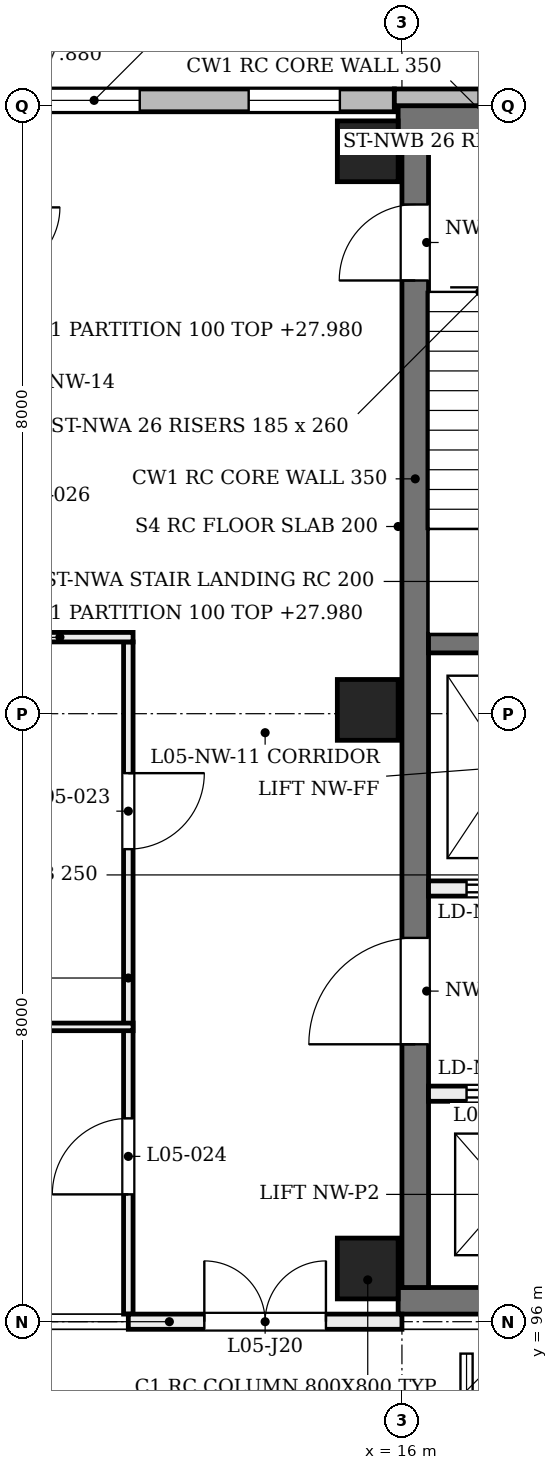
"""IFC4 building model, lengths in metres.
Left out: names, types, materials, properties, quantities, classifications, styles, units other than length and angle.
Written with IfcOpenShell. Run it as: python <this file> out.ifc"""

import sys

from ifc_helpers import new_model, si_unit, direction, frame, frame_2d, origin, origin_2d, place, context, subcontext, project, spatial, rectangle, extrude, element, fill, save


model = new_model("IFC4")
c1 = context("Model", 3, precision=1e-05, world=origin(), true_north=direction((0.0, 1.0)))
c2 = subcontext(c1, "Body", "Model", "MODEL_VIEW")
j1 = project(units=[si_unit("LENGTHUNIT", "METRE"), si_unit("PLANEANGLEUNIT", "RADIAN")], contexts=[c1])
p1 = place(None, origin())
s1 = spatial("IfcSite", under=j1, at=p1, CompositionType="ELEMENT")
p2 = place(p1, origin())
s2 = spatial("IfcBuilding", under=s1, at=p2, CompositionType="ELEMENT")
p3 = place(p2, frame((0.0, 0.0, 24.0)))
s3 = spatial("IfcBuildingStorey", under=s2, at=p3, CompositionType="ELEMENT", Elevation=24.0)
for number, where, z_axis, x_axis in (
    (1, (15.95, 96.275, 0.0), (0.0, 0.0, 1.0), (1.0, 0.0, 0.0)),
    (2, (15.95, 111.825, 0.0), (0.0, 0.0, 1.0), (1.0, 0.0, 0.0)),
):
    element("IfcWall", number, at=place(p3, frame(where, z_axis=z_axis, x_axis=x_axis)), inside=s3, PredefinedType="SHEAR", context=c2, shape_type="SweptSolid", body=[
        extrude(rectangle(XDim=7.95, YDim=0.35, at=frame_2d((3.975, 0.0))), origin(), (0.0, 0.0, 1.0), 4.58),
    ])
p4 = place(p3, frame((16.175, 96.45, 0.0), z_axis=(0.0, 0.0, 1.0), x_axis=(0.0, 1.0, 0.0)))
e3 = element("IfcWall", 3, at=p4, inside=s3, PredefinedType="SHEAR", context=c2, shape_type="SweptSolid", body=[
    extrude(rectangle(XDim=15.2, YDim=0.35, at=frame_2d((7.6, 0.0))), origin(), (0.0, 0.0, 1.0), 4.58),
])
p5 = place(p4, frame((13.25, 0.0, 0.0)))
e4 = element("IfcOpeningElement", 4, at=p5, cuts=e3, PredefinedType="OPENING", context=c2, shape_type="SweptSolid", body=[
    extrude(rectangle(XDim=1.0, YDim=2.1, at=frame_2d((0.5, 1.05))), frame((0.0, 0.185, 0.0), z_axis=(0.0, -1.0, 0.0), x_axis=(1.0, 0.0, 0.0)), (0.0, 0.0, 1.0), 0.37),
])
p6 = place(p4, frame((3.2, 0.0, 0.0)))
e5 = element("IfcOpeningElement", 5, at=p6, cuts=e3, PredefinedType="OPENING", context=c2, shape_type="SweptSolid", body=[
    extrude(rectangle(XDim=1.4, YDim=2.1, at=frame_2d((0.7, 1.05))), frame((0.0, 0.185, 0.0), z_axis=(0.0, -1.0, 0.0), x_axis=(1.0, 0.0, 0.0)), (0.0, 0.0, 1.0), 0.37),
])
for number, where, z_axis, x_axis in (
    (6, (15.55, 96.7, 0.0), (0.0, 0.0, 1.0), (1.0, 0.0, 0.0)),
    (7, (15.55, 104.05, 0.0), (0.0, 0.0, 1.0), (1.0, 0.0, 0.0)),
    (8, (15.55, 111.4, 0.0), (0.0, 0.0, 1.0), (1.0, 0.0, 0.0)),
):
    element("IfcColumn", number, at=place(p3, frame(where, z_axis=z_axis, x_axis=x_axis)), inside=s3, PredefinedType="COLUMN", context=c2, shape_type="SweptSolid", body=[
        extrude(rectangle(XDim=0.8, YDim=0.8, at=origin_2d()), origin(), (0.0, 0.0, 1.0), 4.58),
    ])
p7 = place(p3, frame((8.0, 112.07, 0.0), z_axis=(0.0, 0.0, 1.0), x_axis=(1.0, 0.0, 0.0)))
e9 = element("IfcWall", 9, at=p7, inside=s3, PredefinedType="SOLIDWALL", context=c2, shape_type="SweptSolid", body=[
    extrude(rectangle(XDim=7.9, YDim=0.3, at=frame_2d((3.95, 0.0))), origin(), (0.0, 0.0, 1.0), 3.9),
])
p8 = place(p7, frame((0.717, 0.0, 1.0)))
e10 = element("IfcOpeningElement", 10, at=p8, cuts=e9, PredefinedType="OPENING", context=c2, shape_type="SweptSolid", body=[
    extrude(rectangle(XDim=1.2, YDim=2.4, at=frame_2d((0.6, 1.2))), frame((0.0, 0.16, 0.0), z_axis=(0.0, -1.0, 0.0), x_axis=(1.0, 0.0, 0.0)), (0.0, 0.0, 1.0), 0.32),
])
p9 = place(p7, frame((3.35, 0.0, 1.0)))
e11 = element("IfcOpeningElement", 11, at=p9, cuts=e9, PredefinedType="OPENING", context=c2, shape_type="SweptSolid", body=[
    extrude(rectangle(XDim=1.2, YDim=2.4, at=frame_2d((0.6, 1.2))), frame((0.0, 0.16, 0.0), z_axis=(0.0, -1.0, 0.0), x_axis=(1.0, 0.0, 0.0)), (0.0, 0.0, 1.0), 0.32),
])
p10 = place(p7, frame((5.983, 0.0, 1.0)))
e12 = element("IfcOpeningElement", 12, at=p10, cuts=e9, PredefinedType="OPENING", context=c2, shape_type="SweptSolid", body=[
    extrude(rectangle(XDim=1.2, YDim=2.4, at=frame_2d((0.6, 1.2))), frame((0.0, 0.16, 0.0), z_axis=(0.0, -1.0, 0.0), x_axis=(1.0, 0.0, 0.0)), (0.0, 0.0, 1.0), 0.32),
])
p11 = place(p3, frame((15.9, 112.11, 0.0), z_axis=(0.0, 0.0, 1.0), x_axis=(1.0, 0.0, 0.0)))
e13 = element("IfcWall", 13, at=p11, inside=s3, PredefinedType="SOLIDWALL", context=c2, shape_type="SweptSolid", body=[
    extrude(rectangle(XDim=8.2, YDim=0.22, at=frame_2d((4.1, 0.0))), origin(), (0.0, 0.0, 1.0), 3.9),
])
p12 = place(p11, frame((1.108, 0.0, 0.9)))
e14 = element("IfcOpeningElement", 14, at=p12, cuts=e13, PredefinedType="OPENING", context=c2, shape_type="SweptSolid", body=[
    extrude(rectangle(XDim=0.45, YDim=2.6, at=frame_2d((0.225, 1.3))), frame((0.0, 0.12, 0.0), z_axis=(0.0, -1.0, 0.0), x_axis=(1.0, 0.0, 0.0)), (0.0, 0.0, 1.0), 0.24),
])
p13 = place(p11, frame((3.775, 0.0, 0.9)))
e15 = element("IfcOpeningElement", 15, at=p13, cuts=e13, PredefinedType="OPENING", context=c2, shape_type="SweptSolid", body=[
    extrude(rectangle(XDim=0.45, YDim=2.6, at=frame_2d((0.225, 1.3))), frame((0.0, 0.12, 0.0), z_axis=(0.0, -1.0, 0.0), x_axis=(1.0, 0.0, 0.0)), (0.0, 0.0, 1.0), 0.24),
])
p14 = place(p11, frame((6.442, 0.0, 0.9)))
e16 = element("IfcOpeningElement", 16, at=p14, cuts=e13, PredefinedType="OPENING", context=c2, shape_type="SweptSolid", body=[
    extrude(rectangle(XDim=0.45, YDim=2.6, at=frame_2d((0.225, 1.3))), frame((0.0, 0.12, 0.0), z_axis=(0.0, -1.0, 0.0), x_axis=(1.0, 0.0, 0.0)), (0.0, 0.0, 1.0), 0.24),
])
p15 = place(p3, frame((16.35, 104.925, 0.0), z_axis=(0.0, 0.0, 1.0), x_axis=(1.0, 0.0, 0.0)))
e17 = element("IfcWall", 17, at=p15, inside=s3, PredefinedType="SOLIDWALL", context=c2, shape_type="SweptSolid", body=[
    extrude(rectangle(XDim=3.1, YDim=0.25, at=frame_2d((1.55, 0.0))), origin(), (0.0, 0.0, 1.0), 4.55),
])
p16 = place(p3, frame((16.35, 101.7, 0.0), z_axis=(0.0, 0.0, 1.0), x_axis=(1.0, 0.0, 0.0)))
e18 = element("IfcWall", 18, at=p16, inside=s3, PredefinedType="SOLIDWALL", context=c2, shape_type="SweptSolid", body=[
    extrude(rectangle(XDim=7.2, YDim=0.2, at=frame_2d((3.6, 0.0))), origin(), (0.0, 0.0, 1.0), 4.55),
])
p17 = place(p16, frame((0.5, 0.0, 0.0)))
e19 = element("IfcOpeningElement", 19, at=p17, cuts=e18, PredefinedType="OPENING", context=c2, shape_type="SweptSolid", body=[
    extrude(rectangle(XDim=1.1, YDim=2.1, at=frame_2d((0.55, 1.05))), frame((0.0, 0.11, 0.0), z_axis=(0.0, -1.0, 0.0), x_axis=(1.0, 0.0, 0.0)), (0.0, 0.0, 1.0), 0.22),
])
p18 = place(p16, frame((5.6, 0.0, 0.0)))
e20 = element("IfcOpeningElement", 20, at=p18, cuts=e18, PredefinedType="OPENING", context=c2, shape_type="SweptSolid", body=[
    extrude(rectangle(XDim=1.1, YDim=2.1, at=frame_2d((0.55, 1.05))), frame((0.0, 0.11, 0.0), z_axis=(0.0, -1.0, 0.0), x_axis=(1.0, 0.0, 0.0)), (0.0, 0.0, 1.0), 0.22),
])
p19 = place(p16, frame((3.1, 0.0, 0.0)))
e21 = element("IfcOpeningElement", 21, at=p19, cuts=e18, PredefinedType="OPENING", context=c2, shape_type="SweptSolid", body=[
    extrude(rectangle(XDim=1.0, YDim=2.1, at=frame_2d((0.5, 1.05))), frame((0.0, 0.11, 0.0), z_axis=(0.0, -1.0, 0.0), x_axis=(1.0, 0.0, 0.0)), (0.0, 0.0, 1.0), 0.22),
])
p20 = place(p3, frame((16.35, 99.0, 0.0), z_axis=(0.0, 0.0, 1.0), x_axis=(1.0, 0.0, 0.0)))
e22 = element("IfcWall", 22, at=p20, inside=s3, PredefinedType="SOLIDWALL", context=c2, shape_type="SweptSolid", body=[
    extrude(rectangle(XDim=7.2, YDim=0.2, at=frame_2d((3.6, 0.0))), origin(), (0.0, 0.0, 1.0), 4.55),
])
p21 = place(p20, frame((0.5, 0.0, 0.0)))
e23 = element("IfcOpeningElement", 23, at=p21, cuts=e22, PredefinedType="OPENING", context=c2, shape_type="SweptSolid", body=[
    extrude(rectangle(XDim=1.1, YDim=2.1, at=frame_2d((0.55, 1.05))), frame((0.0, 0.11, 0.0), z_axis=(0.0, -1.0, 0.0), x_axis=(1.0, 0.0, 0.0)), (0.0, 0.0, 1.0), 0.22),
])
p22 = place(p20, frame((5.6, 0.0, 0.0)))
e24 = element("IfcOpeningElement", 24, at=p22, cuts=e22, PredefinedType="OPENING", context=c2, shape_type="SweptSolid", body=[
    extrude(rectangle(XDim=1.1, YDim=2.1, at=frame_2d((0.55, 1.05))), frame((0.0, 0.11, 0.0), z_axis=(0.0, -1.0, 0.0), x_axis=(1.0, 0.0, 0.0)), (0.0, 0.0, 1.0), 0.22),
])
p23 = place(p20, frame((3.1, 0.0, 0.0)))
e25 = element("IfcOpeningElement", 25, at=p23, cuts=e22, PredefinedType="OPENING", context=c2, shape_type="SweptSolid", body=[
    extrude(rectangle(XDim=1.0, YDim=2.1, at=frame_2d((0.5, 1.05))), frame((0.0, 0.11, 0.0), z_axis=(0.0, -1.0, 0.0), x_axis=(1.0, 0.0, 0.0)), (0.0, 0.0, 1.0), 0.22),
])
p24 = place(p3, frame((12.4, 96.1, 0.0), z_axis=(0.0, 0.0, 1.0), x_axis=(0.0, 1.0, 0.0)))
e26 = element("IfcWall", 26, at=p24, inside=s3, PredefinedType="PARTITIONING", context=c2, shape_type="SweptSolid", body=[
    extrude(rectangle(XDim=8.844, YDim=0.125, at=frame_2d((4.422, 0.0))), origin(), (0.0, 0.0, 1.0), 3.88),
])
p25 = place(p24, frame((6.117, 0.0, 0.0)))
e27 = element("IfcOpeningElement", 27, at=p25, cuts=e26, PredefinedType="OPENING", context=c2, shape_type="SweptSolid", body=[
    extrude(rectangle(XDim=1.0, YDim=2.1, at=frame_2d((0.5, 1.05))), frame((0.0, 0.073, 0.0), z_axis=(0.0, -1.0, 0.0), x_axis=(1.0, 0.0, 0.0)), (0.0, 0.0, 1.0), 0.145),
])
p26 = place(p24, frame((1.575, 0.0, 0.0)))
e28 = element("IfcOpeningElement", 28, at=p26, cuts=e26, PredefinedType="OPENING", context=c2, shape_type="SweptSolid", body=[
    extrude(rectangle(XDim=1.0, YDim=2.1, at=frame_2d((0.5, 1.05))), frame((0.0, 0.073, 0.0), z_axis=(0.0, -1.0, 0.0), x_axis=(1.0, 0.0, 0.0)), (0.0, 0.0, 1.0), 0.145),
])
p27 = place(p3, frame((8.3, 99.879, 0.0), z_axis=(0.0, 0.0, 1.0), x_axis=(1.0, 0.0, 0.0)))
e29 = element("IfcWall", 29, at=p27, inside=s3, PredefinedType="PARTITIONING", context=c2, shape_type="SweptSolid", body=[
    extrude(rectangle(XDim=4.162, YDim=0.1, at=frame_2d((2.081, 0.0))), origin(), (0.0, 0.0, 1.0), 3.98),
])
p28 = place(p3, frame((10.538, 105.007, 0.0), z_axis=(0.0, 0.0, 1.0), x_axis=(1.0, 0.0, 0.0)))
e30 = element("IfcWall", 30, at=p28, inside=s3, PredefinedType="PARTITIONING", context=c2, shape_type="SweptSolid", body=[
    extrude(rectangle(XDim=1.925, YDim=0.125, at=frame_2d((0.962, 0.0))), origin(), (0.0, 0.0, 1.0), 4.56),
])
p29 = place(p3, frame((12.4, 96.0, 0.0), z_axis=(0.0, 0.0, 1.0), x_axis=(1.0, 0.0, 0.0)))
e31 = element("IfcWall", 31, at=p29, inside=s3, PredefinedType="PARTITIONING", context=c2, shape_type="SweptSolid", body=[
    extrude(rectangle(XDim=3.6, YDim=0.2, at=frame_2d((1.8, 0.0))), origin(), (0.0, 0.0, 1.0), 3.88),
])
p30 = place(p29, frame((1.0, 0.0, 0.0)))
e32 = element("IfcOpeningElement", 32, at=p30, cuts=e31, PredefinedType="OPENING", context=c2, shape_type="SweptSolid", body=[
    extrude(rectangle(XDim=1.6, YDim=2.1, at=frame_2d((0.8, 1.05))), frame((0.0, 0.11, 0.0), z_axis=(0.0, -1.0, 0.0), x_axis=(1.0, 0.0, 0.0)), (0.0, 0.0, 1.0), 0.22),
])
p31 = place(p9, origin())
e33 = element("IfcWindow", 33, at=p31, inside=s3, PartitioningType="SINGLE_PANEL", PredefinedType="WINDOW", context=c2, shape_type="SweptSolid", body=[
    extrude(rectangle(XDim=1.2, YDim=2.4, at=frame_2d((0.6, 1.2))), frame((0.0, 0.03, 0.0), z_axis=(0.0, -1.0, 0.0), x_axis=(1.0, 0.0, 0.0)), (0.0, 0.0, 1.0), 0.06),
])
fill(e11, e33)
p32 = place(p10, origin())
e34 = element("IfcWindow", 34, at=p32, inside=s3, PartitioningType="SINGLE_PANEL", PredefinedType="WINDOW", context=c2, shape_type="SweptSolid", body=[
    extrude(rectangle(XDim=1.2, YDim=2.4, at=frame_2d((0.6, 1.2))), frame((0.0, 0.03, 0.0), z_axis=(0.0, -1.0, 0.0), x_axis=(1.0, 0.0, 0.0)), (0.0, 0.0, 1.0), 0.06),
])
fill(e12, e34)
p33 = place(p5, origin())
e35 = element("IfcDoor", 35, at=p33, inside=s3, OperationType="SINGLE_SWING_LEFT", PredefinedType="DOOR", context=c2, shape_type="SweptSolid", body=[
    extrude(rectangle(XDim=1.0, YDim=2.1, at=frame_2d((0.5, 1.05))), frame((0.0, 0.025, 0.0), z_axis=(0.0, -1.0, 0.0), x_axis=(1.0, 0.0, 0.0)), (0.0, 0.0, 1.0), 0.05),
])
fill(e4, e35)
p34 = place(p17, frame((1.1, 0.0, 0.0), z_axis=(0.0, 0.0, 1.0), x_axis=(-1.0, 0.0, 0.0)))
e36 = element("IfcDoor", 36, at=p34, inside=s3, OperationType="DOUBLE_DOOR_SLIDING", PredefinedType="DOOR", context=c2, shape_type="SweptSolid", body=[
    extrude(rectangle(XDim=1.1, YDim=2.1, at=frame_2d((0.55, 1.05))), frame((0.0, 0.025, 0.0), z_axis=(0.0, -1.0, 0.0), x_axis=(1.0, 0.0, 0.0)), (0.0, 0.0, 1.0), 0.05),
])
fill(e19, e36)
p35 = place(p21, origin())
e37 = element("IfcDoor", 37, at=p35, inside=s3, OperationType="DOUBLE_DOOR_SLIDING", PredefinedType="DOOR", context=c2, shape_type="SweptSolid", body=[
    extrude(rectangle(XDim=1.1, YDim=2.1, at=frame_2d((0.55, 1.05))), frame((0.0, 0.025, 0.0), z_axis=(0.0, -1.0, 0.0), x_axis=(1.0, 0.0, 0.0)), (0.0, 0.0, 1.0), 0.05),
])
fill(e23, e37)
p36 = place(p6, origin())
e38 = element("IfcDoor", 38, at=p36, inside=s3, OperationType="SINGLE_SWING_LEFT", PredefinedType="DOOR", context=c2, shape_type="SweptSolid", body=[
    extrude(rectangle(XDim=1.4, YDim=2.1, at=frame_2d((0.7, 1.05))), frame((0.0, 0.025, 0.0), z_axis=(0.0, -1.0, 0.0), x_axis=(1.0, 0.0, 0.0)), (0.0, 0.0, 1.0), 0.05),
])
fill(e5, e38)
p37 = place(p25, origin())
e39 = element("IfcDoor", 39, at=p37, inside=s3, OperationType="SINGLE_SWING_RIGHT", PredefinedType="DOOR", context=c2, shape_type="SweptSolid", body=[
    extrude(rectangle(XDim=1.0, YDim=2.1, at=frame_2d((0.5, 1.05))), frame((0.0, 0.025, 0.0), z_axis=(0.0, -1.0, 0.0), x_axis=(1.0, 0.0, 0.0)), (0.0, 0.0, 1.0), 0.05),
])
fill(e27, e39)
p38 = place(p26, origin())
e40 = element("IfcDoor", 40, at=p38, inside=s3, OperationType="SINGLE_SWING_LEFT", PredefinedType="DOOR", context=c2, shape_type="SweptSolid", body=[
    extrude(rectangle(XDim=1.0, YDim=2.1, at=frame_2d((0.5, 1.05))), frame((0.0, 0.025, 0.0), z_axis=(0.0, -1.0, 0.0), x_axis=(1.0, 0.0, 0.0)), (0.0, 0.0, 1.0), 0.05),
])
fill(e28, e40)
p39 = place(p30, origin())
e41 = element("IfcDoor", 41, at=p39, inside=s3, OperationType="DOUBLE_DOOR_SINGLE_SWING", PredefinedType="DOOR", context=c2, shape_type="SweptSolid", body=[
    extrude(rectangle(XDim=1.6, YDim=2.1, at=frame_2d((0.8, 1.05))), frame((0.0, 0.025, 0.0), z_axis=(0.0, -1.0, 0.0), x_axis=(1.0, 0.0, 0.0)), (0.0, 0.0, 1.0), 0.05),
])
fill(e32, e41)
save(model, sys.argv[1])
